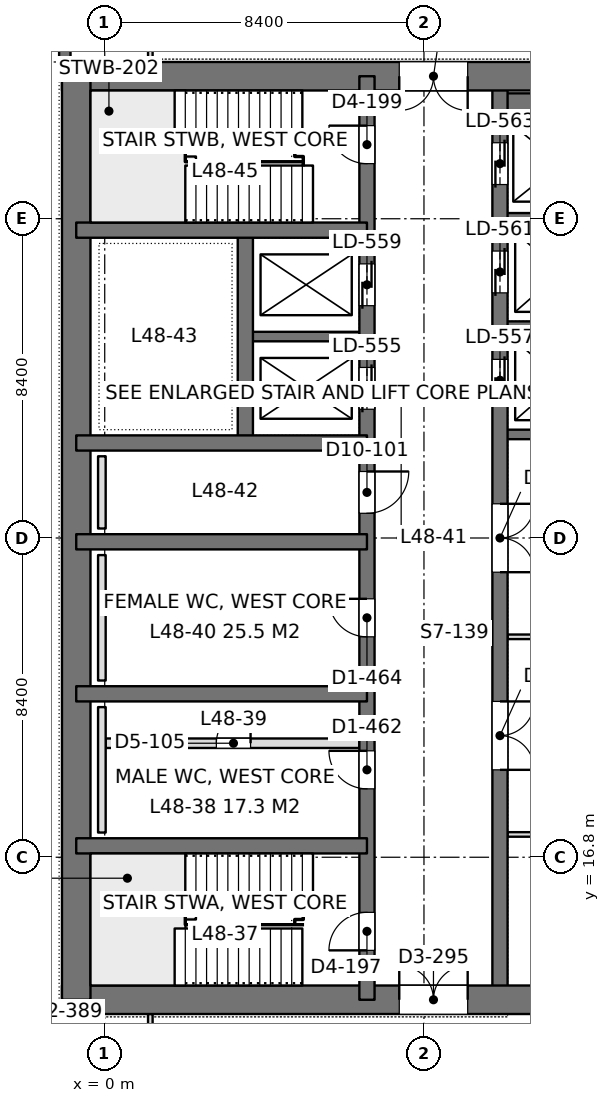
"""IFC4 building model, lengths in metres.
Left out: names, types, materials, properties, quantities, classifications, styles, units other than length and angle.
Written with IfcOpenShell. Run it as: python <this file> out.ifc"""

import sys

from ifc_helpers import new_model, si_unit, direction, frame, frame_2d, origin, place, context, subcontext, project, spatial, rectangle, extrude, element, fill, save


model = new_model("IFC4")
c1 = context("Model", 3, precision=1e-05, world=origin(), true_north=direction((0.0, 1.0)))
c2 = subcontext(c1, "Body", "Model", "MODEL_VIEW")
j1 = project(units=[si_unit("LENGTHUNIT", "METRE"), si_unit("PLANEANGLEUNIT", "RADIAN")], contexts=[c1])
p1 = place(None, origin())
s1 = spatial("IfcSite", under=j1, at=p1, CompositionType="ELEMENT")
p2 = place(p1, origin())
s2 = spatial("IfcBuilding", under=s1, at=p2, CompositionType="ELEMENT")
p3 = place(p2, frame((0.0, 0.0, 211.2)))
s3 = spatial("IfcBuildingStorey", under=s2, at=p3, CompositionType="ELEMENT", Elevation=211.2)
p4 = place(p3, frame((-1.125, 13.05, 0.0), z_axis=(0.0, 0.0, 1.0), x_axis=(1.0, 0.0, 0.0)))
e1 = element("IfcWall", 1, at=p4, inside=s3, PredefinedType="SHEAR", context=c2, shape_type="SweptSolid", body=[
    extrude(rectangle(XDim=17.85, YDim=0.75, at=frame_2d((8.925, 0.0))), origin(), (0.0, 0.0, 1.0), 4.2),
])
p5 = place(p4, frame((8.875, 0.0, 0.0)))
e2 = element("IfcOpeningElement", 2, at=p5, cuts=e1, PredefinedType="OPENING", context=c2, shape_type="SweptSolid", body=[
    extrude(rectangle(XDim=1.8, YDim=2.4, at=frame_2d((0.9, 1.2))), frame((0.0, 0.385, 0.0), z_axis=(0.0, -1.0, 0.0), x_axis=(1.0, 0.0, 0.0)), (0.0, 0.0, 1.0), 0.77),
])
p6 = place(p3, frame((-1.125, 37.35, 0.0), z_axis=(0.0, 0.0, 1.0), x_axis=(1.0, 0.0, 0.0)))
e3 = element("IfcWall", 3, at=p6, inside=s3, PredefinedType="SHEAR", context=c2, shape_type="SweptSolid", body=[
    extrude(rectangle(XDim=17.85, YDim=0.75, at=frame_2d((8.925, 0.0))), origin(), (0.0, 0.0, 1.0), 4.2),
])
p7 = place(p6, frame((8.875, 0.0, 0.0)))
e4 = element("IfcOpeningElement", 4, at=p7, cuts=e3, PredefinedType="OPENING", context=c2, shape_type="SweptSolid", body=[
    extrude(rectangle(XDim=1.8, YDim=2.4, at=frame_2d((0.9, 1.2))), frame((0.0, 0.385, 0.0), z_axis=(0.0, -1.0, 0.0), x_axis=(1.0, 0.0, 0.0)), (0.0, 0.0, 1.0), 0.77),
])
p8 = place(p3, frame((-0.75, 13.05, 0.0), z_axis=(0.0, 0.0, 1.0), x_axis=(0.0, 1.0, 0.0)))
e5 = element("IfcWall", 5, at=p8, inside=s3, PredefinedType="SHEAR", context=c2, shape_type="SweptSolid", body=[
    extrude(rectangle(XDim=24.3, YDim=0.75, at=frame_2d((12.15, 0.0))), origin(), (0.0, 0.0, 1.0), 4.2),
])
p9 = place(p3, frame((6.9, 13.05, 0.0), z_axis=(0.0, 0.0, 1.0), x_axis=(0.0, 1.0, 0.0)))
e6 = element("IfcWall", 6, at=p9, inside=s3, PredefinedType="SHEAR", context=c2, shape_type="SweptSolid", body=[
    extrude(rectangle(XDim=24.3, YDim=0.4, at=frame_2d((12.15, 0.0))), origin(), (0.0, 0.0, 1.0), 4.2),
])
p10 = place(p9, frame((1.3, 0.0, 0.0)))
e7 = element("IfcOpeningElement", 7, at=p10, cuts=e6, PredefinedType="OPENING", context=c2, shape_type="SweptSolid", body=[
    extrude(rectangle(XDim=1.0, YDim=2.2, at=frame_2d((0.5, 1.1))), frame((0.0, 0.21, 0.0), z_axis=(0.0, -1.0, 0.0), x_axis=(1.0, 0.0, 0.0)), (0.0, 0.0, 1.0), 0.42),
])
p11 = place(p9, frame((22.0, 0.0, 0.0)))
e8 = element("IfcOpeningElement", 8, at=p11, cuts=e6, PredefinedType="OPENING", context=c2, shape_type="SweptSolid", body=[
    extrude(rectangle(XDim=1.0, YDim=2.2, at=frame_2d((0.5, 1.1))), frame((0.0, 0.21, 0.0), z_axis=(0.0, -1.0, 0.0), x_axis=(1.0, 0.0, 0.0)), (0.0, 0.0, 1.0), 0.42),
])
p12 = place(p9, frame((5.55, 0.0, 0.0)))
e9 = element("IfcOpeningElement", 9, at=p12, cuts=e6, PredefinedType="OPENING", context=c2, shape_type="SweptSolid", body=[
    extrude(rectangle(XDim=1.0, YDim=2.2, at=frame_2d((0.5, 1.1))), frame((0.0, 0.21, 0.0), z_axis=(0.0, -1.0, 0.0), x_axis=(1.0, 0.0, 0.0)), (0.0, 0.0, 1.0), 0.42),
])
p13 = place(p9, frame((9.55, 0.0, 0.0)))
e10 = element("IfcOpeningElement", 10, at=p13, cuts=e6, PredefinedType="OPENING", context=c2, shape_type="SweptSolid", body=[
    extrude(rectangle(XDim=1.0, YDim=2.2, at=frame_2d((0.5, 1.1))), frame((0.0, 0.21, 0.0), z_axis=(0.0, -1.0, 0.0), x_axis=(1.0, 0.0, 0.0)), (0.0, 0.0, 1.0), 0.42),
])
p14 = place(p9, frame((12.8, 0.0, 0.0)))
e11 = element("IfcOpeningElement", 11, at=p14, cuts=e6, PredefinedType="OPENING", context=c2, shape_type="SweptSolid", body=[
    extrude(rectangle(XDim=1.1, YDim=2.2, at=frame_2d((0.55, 1.1))), frame((0.0, 0.21, 0.0), z_axis=(0.0, -1.0, 0.0), x_axis=(1.0, 0.0, 0.0)), (0.0, 0.0, 1.0), 0.42),
])
p15 = place(p9, frame((15.538, 0.0, 0.0)))
e12 = element("IfcOpeningElement", 12, at=p15, cuts=e6, PredefinedType="OPENING", context=c2, shape_type="SweptSolid", body=[
    extrude(rectangle(XDim=1.1, YDim=2.2, at=frame_2d((0.55, 1.1))), frame((0.0, 0.21, 0.0), z_axis=(0.0, -1.0, 0.0), x_axis=(1.0, 0.0, 0.0)), (0.0, 0.0, 1.0), 0.42),
])
p16 = place(p9, frame((18.262, 0.0, 0.0)))
e13 = element("IfcOpeningElement", 13, at=p16, cuts=e6, PredefinedType="OPENING", context=c2, shape_type="SweptSolid", body=[
    extrude(rectangle(XDim=1.1, YDim=2.2, at=frame_2d((0.55, 1.1))), frame((0.0, 0.21, 0.0), z_axis=(0.0, -1.0, 0.0), x_axis=(1.0, 0.0, 0.0)), (0.0, 0.0, 1.0), 0.42),
])
p17 = place(p3, frame((10.4, 13.05, 0.0), z_axis=(0.0, 0.0, 1.0), x_axis=(0.0, 1.0, 0.0)))
e14 = element("IfcWall", 14, at=p17, inside=s3, PredefinedType="SHEAR", context=c2, shape_type="SweptSolid", body=[
    extrude(rectangle(XDim=24.3, YDim=0.4, at=frame_2d((12.15, 0.0))), origin(), (0.0, 0.0, 1.0), 4.2),
])
p18 = place(p17, frame((15.75, 0.0, 0.0)))
e15 = element("IfcOpeningElement", 15, at=p18, cuts=e14, PredefinedType="OPENING", context=c2, shape_type="SweptSolid", body=[
    extrude(rectangle(XDim=1.1, YDim=2.2, at=frame_2d((0.55, 1.1))), frame((0.0, 0.21, 0.0), z_axis=(0.0, -1.0, 0.0), x_axis=(1.0, 0.0, 0.0)), (0.0, 0.0, 1.0), 0.42),
])
p19 = place(p17, frame((18.6, 0.0, 0.0)))
e16 = element("IfcOpeningElement", 16, at=p19, cuts=e14, PredefinedType="OPENING", context=c2, shape_type="SweptSolid", body=[
    extrude(rectangle(XDim=1.1, YDim=2.2, at=frame_2d((0.55, 1.1))), frame((0.0, 0.21, 0.0), z_axis=(0.0, -1.0, 0.0), x_axis=(1.0, 0.0, 0.0)), (0.0, 0.0, 1.0), 0.42),
])
p20 = place(p17, frame((21.45, 0.0, 0.0)))
e17 = element("IfcOpeningElement", 17, at=p20, cuts=e14, PredefinedType="OPENING", context=c2, shape_type="SweptSolid", body=[
    extrude(rectangle(XDim=1.1, YDim=2.2, at=frame_2d((0.55, 1.1))), frame((0.0, 0.21, 0.0), z_axis=(0.0, -1.0, 0.0), x_axis=(1.0, 0.0, 0.0)), (0.0, 0.0, 1.0), 0.42),
])
p21 = place(p17, frame((6.05, 0.0, 0.0)))
e18 = element("IfcOpeningElement", 18, at=p21, cuts=e14, PredefinedType="OPENING", context=c2, shape_type="SweptSolid", body=[
    extrude(rectangle(XDim=1.8, YDim=2.4, at=frame_2d((0.9, 1.2))), frame((0.0, 0.21, 0.0), z_axis=(0.0, -1.0, 0.0), x_axis=(1.0, 0.0, 0.0)), (0.0, 0.0, 1.0), 0.42),
])
p22 = place(p17, frame((11.25, 0.0, 0.0)))
e19 = element("IfcOpeningElement", 19, at=p22, cuts=e14, PredefinedType="OPENING", context=c2, shape_type="SweptSolid", body=[
    extrude(rectangle(XDim=1.8, YDim=2.4, at=frame_2d((0.9, 1.2))), frame((0.0, 0.21, 0.0), z_axis=(0.0, -1.0, 0.0), x_axis=(1.0, 0.0, 0.0)), (0.0, 0.0, 1.0), 0.42),
])
for number, where, z_axis, x_axis in (
    (20, (-0.75, 17.1, 0.0), (0.0, 0.0, 1.0), (1.0, 0.0, 0.0)),
    (21, (-0.75, 21.1, 0.0), (0.0, 0.0, 1.0), (1.0, 0.0, 0.0)),
    (22, (-0.75, 25.1, 0.0), (0.0, 0.0, 1.0), (1.0, 0.0, 0.0)),
    (23, (-0.75, 27.7, 0.0), (0.0, 0.0, 1.0), (1.0, 0.0, 0.0)),
    (24, (-0.75, 33.3, 0.0), (0.0, 0.0, 1.0), (1.0, 0.0, 0.0)),
):
    element("IfcWall", number, at=place(p3, frame(where, z_axis=z_axis, x_axis=x_axis)), inside=s3, PredefinedType="SHEAR", context=c2, shape_type="SweptSolid", body=[
        extrude(rectangle(XDim=7.65, YDim=0.4, at=frame_2d((3.825, 0.0))), origin(), (0.0, 0.0, 1.0), 4.2),
    ])
p23 = place(p3, frame((3.7, 27.7, 0.0), z_axis=(0.0, 0.0, 1.0), x_axis=(0.0, 1.0, 0.0)))
e25 = element("IfcWall", 25, at=p23, inside=s3, PredefinedType="SHEAR", context=c2, shape_type="SweptSolid", body=[
    extrude(rectangle(XDim=5.6, YDim=0.4, at=frame_2d((2.8, 0.0))), origin(), (0.0, 0.0, 1.0), 4.2),
])
p24 = place(p3, frame((3.7, 30.5, 0.0), z_axis=(0.0, 0.0, 1.0), x_axis=(1.0, 0.0, 0.0)))
e26 = element("IfcWall", 26, at=p24, inside=s3, PredefinedType="SHEAR", context=c2, shape_type="SweptSolid", body=[
    extrude(rectangle(XDim=3.2, YDim=0.25, at=frame_2d((1.6, 0.0))), origin(), (0.0, 0.0, 1.0), 4.2),
])
p25 = place(p3, frame((10.4, 27.925, 0.0), z_axis=(0.0, 0.0, 1.0), x_axis=(1.0, 0.0, 0.0)))
e27 = element("IfcWall", 27, at=p25, inside=s3, PredefinedType="SHEAR", context=c2, shape_type="SweptSolid", body=[
    extrude(rectangle(XDim=5.95, YDim=0.25, at=frame_2d((2.975, 0.0))), origin(), (0.0, 0.0, 1.0), 4.2),
])
for number, where, z_axis, x_axis in (
    (28, (10.4, 30.775, 0.0), (0.0, 0.0, 1.0), (1.0, 0.0, 0.0)),
    (29, (10.4, 33.625, 0.0), (0.0, 0.0, 1.0), (1.0, 0.0, 0.0)),
):
    element("IfcWall", number, at=place(p3, frame(where, z_axis=z_axis, x_axis=x_axis)), inside=s3, PredefinedType="SHEAR", context=c2, shape_type="SweptSolid", body=[
        extrude(rectangle(XDim=3.2, YDim=0.25, at=frame_2d((1.6, 0.0))), origin(), (0.0, 0.0, 1.0), 4.2),
    ])
p26 = place(p3, frame((10.4, 36.625, 0.0), z_axis=(0.0, 0.0, 1.0), x_axis=(1.0, 0.0, 0.0)))
e30 = element("IfcWall", 30, at=p26, inside=s3, PredefinedType="SHEAR", context=c2, shape_type="SweptSolid", body=[
    extrude(rectangle(XDim=3.2, YDim=0.55, at=frame_2d((1.6, 0.0))), origin(), (0.0, 0.0, 1.0), 4.2),
])
p27 = place(p3, frame((-1.05, 8.4, 0.0), z_axis=(0.0, 0.0, 1.0), x_axis=(0.0, 1.0, 0.0)))
e31 = element("IfcWall", 31, at=p27, inside=s3, PredefinedType="SOLIDWALL", context=c2, shape_type="SweptSolid", body=[
    extrude(rectangle(XDim=4.275, YDim=0.3, at=frame_2d((2.138, 0.0))), origin(), (0.0, 0.0, 1.0), 4.05),
])
p28 = place(p27, frame((0.938, 0.0, 0.9)))
e32 = element("IfcOpeningElement", 32, at=p28, cuts=e31, PredefinedType="OPENING", context=c2, shape_type="SweptSolid", body=[
    extrude(rectangle(XDim=2.4, YDim=1.9, at=frame_2d((1.2, 0.95))), frame((0.0, 0.16, 0.0), z_axis=(0.0, -1.0, 0.0), x_axis=(1.0, 0.0, 0.0)), (0.0, 0.0, 1.0), 0.32),
])
p29 = place(p3, frame((-1.05, 37.725, 0.0), z_axis=(0.0, 0.0, 1.0), x_axis=(0.0, 1.0, 0.0)))
e33 = element("IfcWall", 33, at=p29, inside=s3, PredefinedType="SOLIDWALL", context=c2, shape_type="SweptSolid", body=[
    extrude(rectangle(XDim=4.275, YDim=0.3, at=frame_2d((2.137, 0.0))), origin(), (0.0, 0.0, 1.0), 4.05),
])
p30 = place(p29, frame((0.938, 0.0, 0.9)))
e34 = element("IfcOpeningElement", 34, at=p30, cuts=e33, PredefinedType="OPENING", context=c2, shape_type="SweptSolid", body=[
    extrude(rectangle(XDim=2.4, YDim=1.9, at=frame_2d((1.2, 0.95))), frame((0.0, 0.16, 0.0), z_axis=(0.0, -1.0, 0.0), x_axis=(1.0, 0.0, 0.0)), (0.0, 0.0, 1.0), 0.32),
])
p31 = place(p3, frame((10.598, 17.4, 0.0), z_axis=(0.0, 0.0, 1.0), x_axis=(1.0, 0.0, 0.0)))
e35 = element("IfcWall", 35, at=p31, inside=s3, PredefinedType="PARTITIONING", context=c2, shape_type="SweptSolid", body=[
    extrude(rectangle(XDim=5.904, YDim=0.12, at=frame_2d((2.952, 0.0))), origin(), (0.0, 0.0, 1.0), 3.55),
])
p32 = place(p3, frame((10.598, 22.6, 0.0), z_axis=(0.0, 0.0, 1.0), x_axis=(1.0, 0.0, 0.0)))
e36 = element("IfcWall", 36, at=p32, inside=s3, PredefinedType="PARTITIONING", context=c2, shape_type="SweptSolid", body=[
    extrude(rectangle(XDim=5.053, YDim=0.12, at=frame_2d((2.526, 0.0))), origin(), (0.0, 0.0, 1.0), 4.05),
])
p33 = place(p3, frame((1.2, 10.7, 0.0), z_axis=(0.0, 0.0, 1.0), x_axis=(0.0, 1.0, 0.0)))
e37 = element("IfcWall", 37, at=p33, inside=s3, PredefinedType="PARTITIONING", context=c2, shape_type="SweptSolid", body=[
    extrude(rectangle(XDim=1.976, YDim=0.12, at=frame_2d((0.988, 0.0))), origin(), (0.0, 0.0, 1.0), 4.05),
])
p34 = place(p3, frame((1.2, 37.724, 0.0), z_axis=(0.0, 0.0, 1.0), x_axis=(0.0, 1.0, 0.0)))
e38 = element("IfcWall", 38, at=p34, inside=s3, PredefinedType="PARTITIONING", context=c2, shape_type="SweptSolid", body=[
    extrude(rectangle(XDim=1.976, YDim=0.12, at=frame_2d((0.988, 0.0))), origin(), (0.0, 0.0, 1.0), 4.05),
])
p35 = place(p3, frame((0.025, 19.8, 0.0), z_axis=(0.0, 0.0, 1.0), x_axis=(1.0, 0.0, 0.0)))
e39 = element("IfcWall", 39, at=p35, inside=s3, PredefinedType="PARTITIONING", context=c2, shape_type="SweptSolid", body=[
    extrude(rectangle(XDim=6.675, YDim=0.25, at=frame_2d((3.337, 0.0))), origin(), (0.0, 0.0, 1.0), 4.0),
])
p36 = place(p35, frame((2.913, 0.0, 0.0)))
e40 = element("IfcOpeningElement", 40, at=p36, cuts=e39, PredefinedType="OPENING", context=c2, shape_type="SweptSolid", body=[
    extrude(rectangle(XDim=0.9, YDim=2.2, at=frame_2d((0.45, 1.1))), frame((0.0, 0.135, 0.0), z_axis=(0.0, -1.0, 0.0), x_axis=(1.0, 0.0, 0.0)), (0.0, 0.0, 1.0), 0.27),
])
for number, where, z_axis, x_axis in (
    (41, (-0.075, 17.45, 0.0), (0.0, 0.0, 1.0), (0.0, 1.0, 0.0)),
    (42, (-0.075, 21.45, 0.0), (0.0, 0.0, 1.0), (0.0, 1.0, 0.0)),
):
    element("IfcWall", number, at=place(p3, frame(where, z_axis=z_axis, x_axis=x_axis)), inside=s3, PredefinedType="PLUMBINGWALL", context=c2, shape_type="SweptSolid", body=[
        extrude(rectangle(XDim=3.3, YDim=0.2, at=frame_2d((1.65, 0.0))), origin(), (0.0, 0.0, 1.0), 1.2),
    ])
p37 = place(p3, frame((-0.075, 25.45, 0.0), z_axis=(0.0, 0.0, 1.0), x_axis=(0.0, 1.0, 0.0)))
e43 = element("IfcWall", 43, at=p37, inside=s3, PredefinedType="PLUMBINGWALL", context=c2, shape_type="SweptSolid", body=[
    extrude(rectangle(XDim=1.9, YDim=0.2, at=frame_2d((0.95, 0.0))), origin(), (0.0, 0.0, 1.0), 1.2),
])
p38 = place(p5, origin())
e44 = element("IfcDoor", 44, at=p38, inside=s3, OperationType="DOUBLE_DOOR_SINGLE_SWING", PredefinedType="DOOR", context=c2, shape_type="SweptSolid", body=[
    extrude(rectangle(XDim=1.8, YDim=2.4, at=frame_2d((0.9, 1.2))), frame((0.0, 0.025, 0.0), z_axis=(0.0, -1.0, 0.0), x_axis=(1.0, 0.0, 0.0)), (0.0, 0.0, 1.0), 0.05),
])
fill(e2, e44)
p39 = place(p7, frame((1.8, 0.0, 0.0), z_axis=(0.0, 0.0, 1.0), x_axis=(-1.0, 0.0, 0.0)))
e45 = element("IfcDoor", 45, at=p39, inside=s3, OperationType="DOUBLE_DOOR_SINGLE_SWING", PredefinedType="DOOR", context=c2, shape_type="SweptSolid", body=[
    extrude(rectangle(XDim=1.8, YDim=2.4, at=frame_2d((0.9, 1.2))), frame((0.0, 0.025, 0.0), z_axis=(0.0, -1.0, 0.0), x_axis=(1.0, 0.0, 0.0)), (0.0, 0.0, 1.0), 0.05),
])
fill(e4, e45)
p40 = place(p10, origin())
e46 = element("IfcDoor", 46, at=p40, inside=s3, OperationType="SINGLE_SWING_LEFT", PredefinedType="DOOR", context=c2, shape_type="SweptSolid", body=[
    extrude(rectangle(XDim=1.0, YDim=2.2, at=frame_2d((0.5, 1.1))), frame((0.0, 0.025, 0.0), z_axis=(0.0, -1.0, 0.0), x_axis=(1.0, 0.0, 0.0)), (0.0, 0.0, 1.0), 0.05),
])
fill(e7, e46)
p41 = place(p11, origin())
e47 = element("IfcDoor", 47, at=p41, inside=s3, OperationType="SINGLE_SWING_RIGHT", PredefinedType="DOOR", context=c2, shape_type="SweptSolid", body=[
    extrude(rectangle(XDim=1.0, YDim=2.2, at=frame_2d((0.5, 1.1))), frame((0.0, 0.025, 0.0), z_axis=(0.0, -1.0, 0.0), x_axis=(1.0, 0.0, 0.0)), (0.0, 0.0, 1.0), 0.05),
])
fill(e8, e47)
p42 = place(p12, origin())
e48 = element("IfcDoor", 48, at=p42, inside=s3, OperationType="SINGLE_SWING_RIGHT", PredefinedType="DOOR", context=c2, shape_type="SweptSolid", body=[
    extrude(rectangle(XDim=1.0, YDim=2.2, at=frame_2d((0.5, 1.1))), frame((0.0, 0.025, 0.0), z_axis=(0.0, -1.0, 0.0), x_axis=(1.0, 0.0, 0.0)), (0.0, 0.0, 1.0), 0.05),
])
fill(e9, e48)
p43 = place(p13, origin())
e49 = element("IfcDoor", 49, at=p43, inside=s3, OperationType="SINGLE_SWING_RIGHT", PredefinedType="DOOR", context=c2, shape_type="SweptSolid", body=[
    extrude(rectangle(XDim=1.0, YDim=2.2, at=frame_2d((0.5, 1.1))), frame((0.0, 0.025, 0.0), z_axis=(0.0, -1.0, 0.0), x_axis=(1.0, 0.0, 0.0)), (0.0, 0.0, 1.0), 0.05),
])
fill(e10, e49)
p44 = place(p14, frame((1.1, 0.0, 0.0), z_axis=(0.0, 0.0, 1.0), x_axis=(-1.0, 0.0, 0.0)))
e50 = element("IfcDoor", 50, at=p44, inside=s3, OperationType="SINGLE_SWING_LEFT", PredefinedType="DOOR", context=c2, shape_type="SweptSolid", body=[
    extrude(rectangle(XDim=1.1, YDim=2.2, at=frame_2d((0.55, 1.1))), frame((0.0, 0.025, 0.0), z_axis=(0.0, -1.0, 0.0), x_axis=(1.0, 0.0, 0.0)), (0.0, 0.0, 1.0), 0.05),
])
fill(e11, e50)
p45 = place(p18, origin())
e51 = element("IfcDoor", 51, at=p45, inside=s3, OperationType="DOUBLE_DOOR_SLIDING", PredefinedType="DOOR", context=c2, shape_type="SweptSolid", body=[
    extrude(rectangle(XDim=1.1, YDim=2.2, at=frame_2d((0.55, 1.1))), frame((0.0, 0.025, 0.0), z_axis=(0.0, -1.0, 0.0), x_axis=(1.0, 0.0, 0.0)), (0.0, 0.0, 1.0), 0.05),
])
fill(e15, e51)
p46 = place(p19, origin())
e52 = element("IfcDoor", 52, at=p46, inside=s3, OperationType="DOUBLE_DOOR_SLIDING", PredefinedType="DOOR", context=c2, shape_type="SweptSolid", body=[
    extrude(rectangle(XDim=1.1, YDim=2.2, at=frame_2d((0.55, 1.1))), frame((0.0, 0.025, 0.0), z_axis=(0.0, -1.0, 0.0), x_axis=(1.0, 0.0, 0.0)), (0.0, 0.0, 1.0), 0.05),
])
fill(e16, e52)
p47 = place(p20, origin())
e53 = element("IfcDoor", 53, at=p47, inside=s3, OperationType="DOUBLE_DOOR_SLIDING", PredefinedType="DOOR", context=c2, shape_type="SweptSolid", body=[
    extrude(rectangle(XDim=1.1, YDim=2.2, at=frame_2d((0.55, 1.1))), frame((0.0, 0.025, 0.0), z_axis=(0.0, -1.0, 0.0), x_axis=(1.0, 0.0, 0.0)), (0.0, 0.0, 1.0), 0.05),
])
fill(e17, e53)
p48 = place(p15, origin())
e54 = element("IfcDoor", 54, at=p48, inside=s3, OperationType="DOUBLE_DOOR_SLIDING", PredefinedType="DOOR", context=c2, shape_type="SweptSolid", body=[
    extrude(rectangle(XDim=1.1, YDim=2.2, at=frame_2d((0.55, 1.1))), frame((0.0, 0.025, 0.0), z_axis=(0.0, -1.0, 0.0), x_axis=(1.0, 0.0, 0.0)), (0.0, 0.0, 1.0), 0.05),
])
fill(e12, e54)
p49 = place(p16, origin())
e55 = element("IfcDoor", 55, at=p49, inside=s3, OperationType="DOUBLE_DOOR_SLIDING", PredefinedType="DOOR", context=c2, shape_type="SweptSolid", body=[
    extrude(rectangle(XDim=1.1, YDim=2.2, at=frame_2d((0.55, 1.1))), frame((0.0, 0.025, 0.0), z_axis=(0.0, -1.0, 0.0), x_axis=(1.0, 0.0, 0.0)), (0.0, 0.0, 1.0), 0.05),
])
fill(e13, e55)
p50 = place(p21, frame((1.8, 0.0, 0.0), z_axis=(0.0, 0.0, 1.0), x_axis=(-1.0, 0.0, 0.0)))
e56 = element("IfcDoor", 56, at=p50, inside=s3, OperationType="DOUBLE_DOOR_SINGLE_SWING", PredefinedType="DOOR", context=c2, shape_type="SweptSolid", body=[
    extrude(rectangle(XDim=1.8, YDim=2.4, at=frame_2d((0.9, 1.2))), frame((0.0, 0.025, 0.0), z_axis=(0.0, -1.0, 0.0), x_axis=(1.0, 0.0, 0.0)), (0.0, 0.0, 1.0), 0.05),
])
fill(e18, e56)
p51 = place(p22, frame((1.8, 0.0, 0.0), z_axis=(0.0, 0.0, 1.0), x_axis=(-1.0, 0.0, 0.0)))
e57 = element("IfcDoor", 57, at=p51, inside=s3, OperationType="DOUBLE_DOOR_SINGLE_SWING", PredefinedType="DOOR", context=c2, shape_type="SweptSolid", body=[
    extrude(rectangle(XDim=1.8, YDim=2.4, at=frame_2d((0.9, 1.2))), frame((0.0, 0.025, 0.0), z_axis=(0.0, -1.0, 0.0), x_axis=(1.0, 0.0, 0.0)), (0.0, 0.0, 1.0), 0.05),
])
fill(e19, e57)
p52 = place(p36, origin())
e58 = element("IfcDoor", 58, at=p52, inside=s3, OperationType="SINGLE_SWING_RIGHT", PredefinedType="DOOR", context=c2, shape_type="SweptSolid", body=[
    extrude(rectangle(XDim=0.9, YDim=2.2, at=frame_2d((0.45, 1.1))), frame((0.0, 0.025, 0.0), z_axis=(0.0, -1.0, 0.0), x_axis=(1.0, 0.0, 0.0)), (0.0, 0.0, 1.0), 0.05),
])
fill(e40, e58)
save(model, sys.argv[1])
